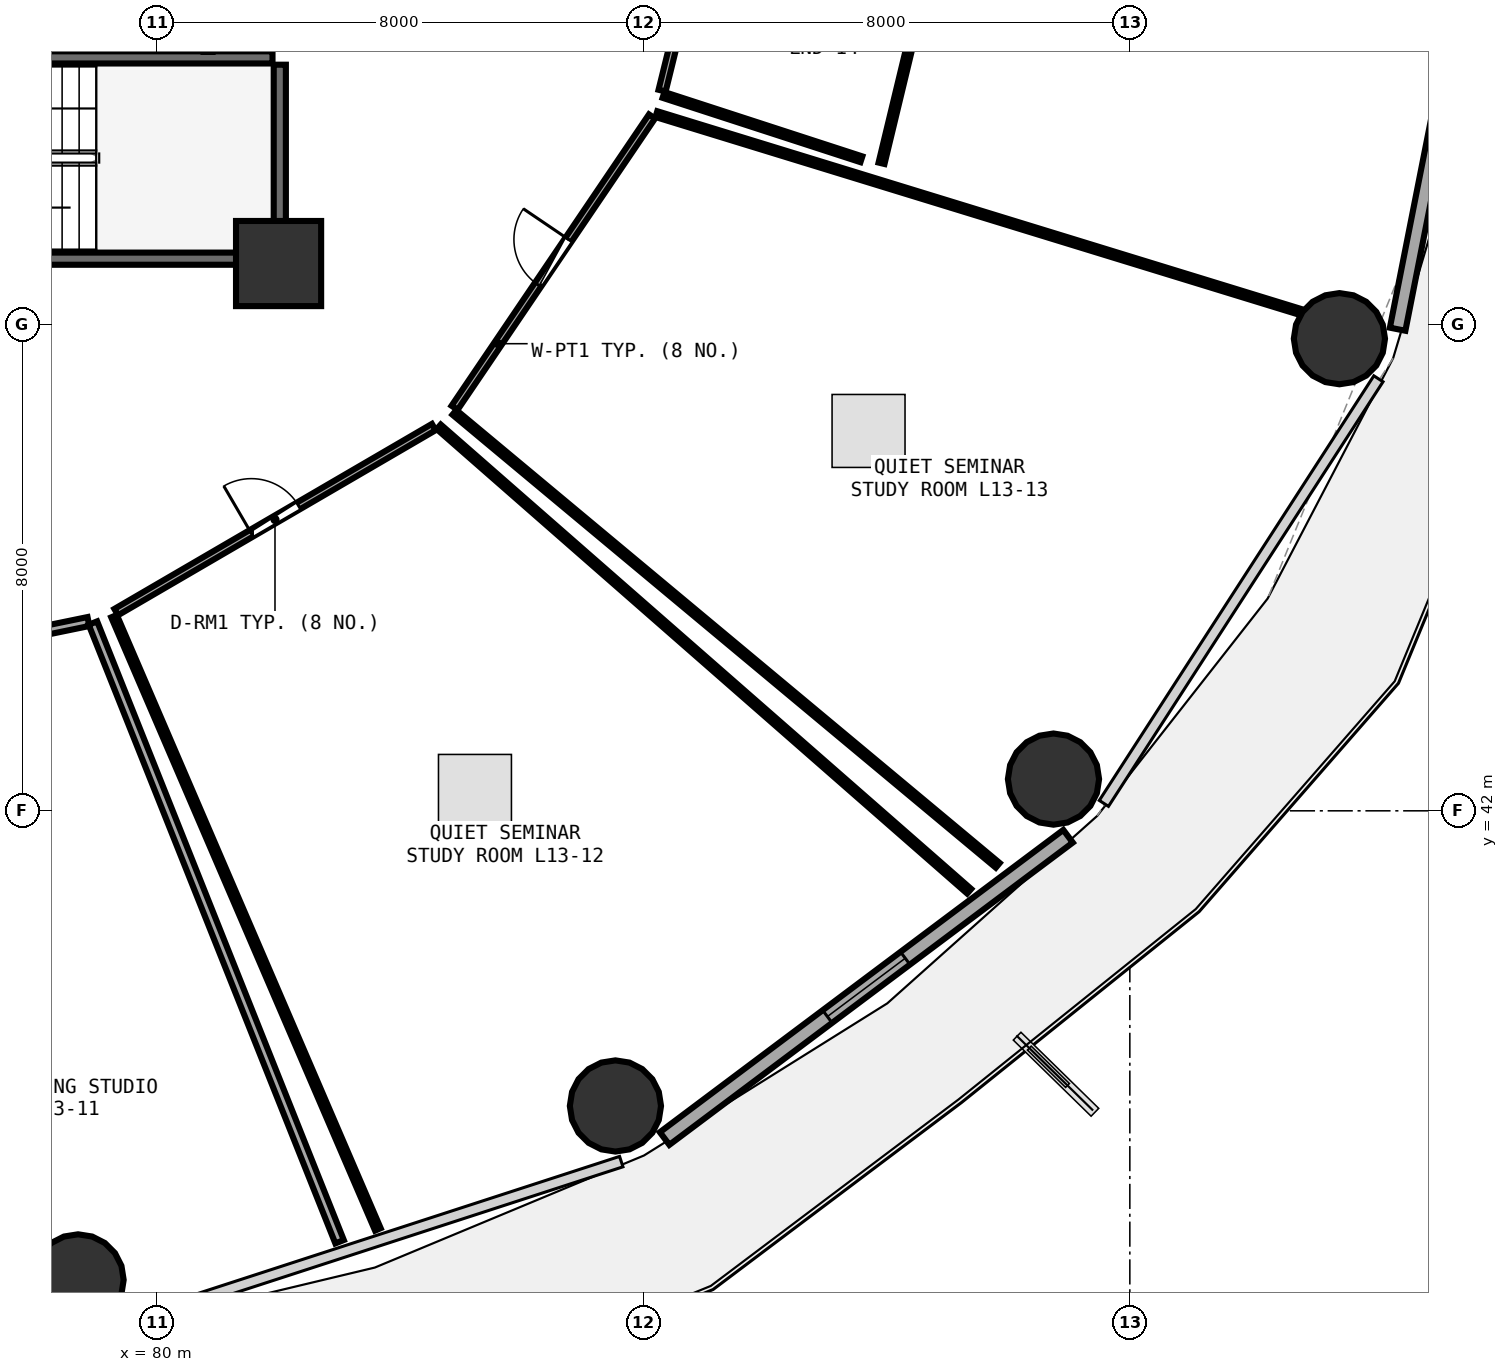
"""IFC4 building model, lengths in metres.
Left out: names, types, materials, properties, quantities, classifications, styles, units other than length and angle.
Written with IfcOpenShell. Run it as: python <this file> out.ifc"""

import sys

from ifc_helpers import new_model, si_unit, direction, frame, frame_2d, origin, origin_2d, place, context, subcontext, project, spatial, rectangle, circle, extrude, element, fill, save


model = new_model("IFC4")
c1 = context("Model", 3, precision=1e-05, world=origin(), true_north=direction((0.0, 1.0)))
c2 = subcontext(c1, "Body", "Model", "MODEL_VIEW")
j1 = project(units=[si_unit("LENGTHUNIT", "METRE"), si_unit("PLANEANGLEUNIT", "RADIAN")], contexts=[c1])
p1 = place(None, origin())
s1 = spatial("IfcSite", under=j1, at=p1, CompositionType="ELEMENT")
p2 = place(p1, origin())
s2 = spatial("IfcBuilding", under=s1, at=p2, CompositionType="ELEMENT")
p3 = place(p2, frame((0.0, 0.0, 52.5)))
s3 = spatial("IfcBuildingStorey", under=s2, at=p3, CompositionType="ELEMENT", Elevation=52.5)
p4 = place(p3, frame((82.0, 51.0, 0.0), z_axis=(0.0, 0.0, 1.0), x_axis=(1.0, 0.0, 0.0)))
e1 = element("IfcColumn", 1, at=p4, inside=s3, PredefinedType="PILASTER", context=c2, shape_type="SweptSolid", body=[
    extrude(rectangle(XDim=1.4, YDim=1.4, at=origin_2d()), origin(), (0.0, 0.0, 1.0), 3.75),
])
for number, where, z_axis, x_axis in (
    (2, (78.702, 34.286, 0.0), (0.0, 0.0, 1.0), (1.0, 0.0, 0.0)),
    (3, (87.54, 37.146, 0.0), (0.0, 0.0, 1.0), (1.0, 0.0, 0.0)),
    (4, (94.744, 42.522, 0.0), (0.0, 0.0, 1.0), (1.0, 0.0, 0.0)),
    (5, (99.447, 49.764, 0.0), (0.0, 0.0, 1.0), (1.0, 0.0, 0.0)),
):
    element("IfcColumn", number, at=place(p3, frame(where, z_axis=z_axis, x_axis=x_axis)), inside=s3, PredefinedType="COLUMN", context=c2, shape_type="SweptSolid", body=[
        extrude(circle(Radius=0.75, at=origin_2d()), origin(), (0.0, 0.0, 1.0), 3.75),
    ])
p5 = place(p3, frame((88.349, 36.611, 0.0), z_axis=(0.0, 0.0, 1.0), x_axis=(0.80030733173, 0.599590005569, 0.0)))
e6 = element("IfcWall", 6, at=p5, inside=s3, PredefinedType="SOLIDWALL", context=c2, shape_type="SweptSolid", body=[
    extrude(rectangle(XDim=8.291, YDim=0.26, at=frame_2d((4.145, 0.0))), origin(), (0.0, 0.0, 1.0), 3.475),
])
p6 = place(p5, frame((3.345, 0.0, 0.85)))
e7 = element("IfcOpeningElement", 7, at=p6, cuts=e6, PredefinedType="OPENING", context=c2, shape_type="SweptSolid", body=[
    extrude(rectangle(XDim=1.6, YDim=1.45, at=frame_2d((0.8, 0.725))), frame((0.0, 0.14, 0.0), z_axis=(0.0, -1.0, 0.0), x_axis=(1.0, 0.0, 0.0)), (0.0, 0.0, 1.0), 0.28),
])
p7 = place(p3, frame((100.404, 49.92, 0.0), z_axis=(0.0, 0.0, 1.0), x_axis=(0.193726159581, 0.98105564322, 0.0)))
e8 = element("IfcWall", 8, at=p7, inside=s3, PredefinedType="SOLIDWALL", context=c2, shape_type="SweptSolid", body=[
    extrude(rectangle(XDim=7.703, YDim=0.26, at=frame_2d((3.851, 0.0))), origin(), (0.0, 0.0, 1.0), 3.475),
])
p8 = place(p7, frame((3.051, 0.0, 0.85)))
e9 = element("IfcOpeningElement", 9, at=p8, cuts=e8, PredefinedType="OPENING", context=c2, shape_type="SweptSolid", body=[
    extrude(rectangle(XDim=1.6, YDim=1.45, at=frame_2d((0.8, 0.725))), frame((0.0, 0.14, 0.0), z_axis=(0.0, -1.0, 0.0), x_axis=(1.0, 0.0, 0.0)), (0.0, 0.0, 1.0), 0.28),
])
p9 = place(p3, frame((74.0, 51.08, 0.0), z_axis=(0.0, 0.0, 1.0), x_axis=(1.0, 0.0, 0.0)))
e10 = element("IfcWall", 10, at=p9, inside=s3, PredefinedType="SHEAR", context=c2, shape_type="SweptSolid", body=[
    extrude(rectangle(XDim=7.9, YDim=0.2, at=frame_2d((3.95, 0.0))), origin(), (0.0, 0.0, 1.0), 3.49),
])
p10 = place(p9, frame((1.12, 0.0, 0.0)))
e11 = element("IfcOpeningElement", 11, at=p10, cuts=e10, PredefinedType="OPENING", context=c2, shape_type="SweptSolid", body=[
    extrude(rectangle(XDim=1.05, YDim=2.1, at=frame_2d((0.525, 1.05))), frame((0.0, 0.11, 0.0), z_axis=(0.0, -1.0, 0.0), x_axis=(1.0, 0.0, 0.0)), (0.0, 0.0, 1.0), 0.22),
])
p11 = place(p3, frame((82.02, 51.2, 0.0), z_axis=(0.0, 0.0, 1.0), x_axis=(0.0, 1.0, 0.0)))
e12 = element("IfcWall", 12, at=p11, inside=s3, PredefinedType="SHEAR", context=c2, shape_type="SweptSolid", body=[
    extrude(rectangle(XDim=3.07, YDim=0.2, at=frame_2d((1.535, 0.0))), origin(), (0.0, 0.0, 1.0), 3.49),
])
p12 = place(p3, frame((81.9, 54.39, 0.0), z_axis=(0.0, 0.0, 1.0), x_axis=(-1.0, 0.0, 0.0)))
e13 = element("IfcWall", 13, at=p12, inside=s3, PredefinedType="SHEAR", context=c2, shape_type="SweptSolid", body=[
    extrude(rectangle(XDim=8.46, YDim=0.2, at=frame_2d((4.23, 0.0))), origin(), (0.0, 0.0, 1.0), 3.49),
])
p13 = place(p3, frame((75.732, 44.467, 0.0), z_axis=(0.0, 0.0, 1.0), x_axis=(0.979521553546, 0.201339330831, 0.0)))
e14 = element("IfcWall", 14, at=p13, inside=s3, PredefinedType="PARTITIONING", context=c2, shape_type="SweptSolid", body=[
    extrude(rectangle(XDim=3.207, YDim=0.15, at=frame_2d((1.604, 0.0))), origin(), (0.0, 0.0, 1.0), 3.235),
])
p14 = place(p13, frame((1.129, 0.0, 0.0)))
e15 = element("IfcOpeningElement", 15, at=p14, cuts=e14, PredefinedType="OPENING", context=c2, shape_type="SweptSolid", body=[
    extrude(rectangle(XDim=0.95, YDim=2.08, at=frame_2d((0.475, 1.04))), frame((0.0, 0.085, 0.0), z_axis=(0.0, -1.0, 0.0), x_axis=(1.0, 0.0, 0.0)), (0.0, 0.0, 1.0), 0.17),
])
p15 = place(p3, frame((79.33, 45.268, 0.0), z_axis=(0.0, 0.0, 1.0), x_axis=(0.864061520755, 0.503386221852, 0.0)))
e16 = element("IfcWall", 16, at=p15, inside=s3, PredefinedType="PARTITIONING", context=c2, shape_type="SweptSolid", body=[
    extrude(rectangle(XDim=6.044, YDim=0.12, at=frame_2d((3.022, 0.0))), origin(), (0.0, 0.0, 1.0), 2.875),
])
p16 = place(p15, frame((2.572, 0.0, 0.0)))
e17 = element("IfcOpeningElement", 17, at=p16, cuts=e16, PredefinedType="OPENING", context=c2, shape_type="SweptSolid", body=[
    extrude(rectangle(XDim=0.9, YDim=2.08, at=frame_2d((0.45, 1.04))), frame((0.0, 0.07, 0.0), z_axis=(0.0, -1.0, 0.0), x_axis=(1.0, 0.0, 0.0)), (0.0, 0.0, 1.0), 0.14),
])
p17 = place(p3, frame((84.895, 48.628, 0.0), z_axis=(0.0, 0.0, 1.0), x_axis=(0.560933949984, 0.827860558159, 0.0)))
e18 = element("IfcWall", 18, at=p17, inside=s3, PredefinedType="PARTITIONING", context=c2, shape_type="SweptSolid", body=[
    extrude(rectangle(XDim=5.788, YDim=0.12, at=frame_2d((2.894, 0.0))), origin(), (0.0, 0.0, 1.0), 2.875),
])
p18 = place(p17, frame((2.444, 0.0, 0.0)))
e19 = element("IfcOpeningElement", 19, at=p18, cuts=e18, PredefinedType="OPENING", context=c2, shape_type="SweptSolid", body=[
    extrude(rectangle(XDim=0.9, YDim=2.08, at=frame_2d((0.45, 1.04))), frame((0.0, 0.07, 0.0), z_axis=(0.0, -1.0, 0.0), x_axis=(1.0, 0.0, 0.0)), (0.0, 0.0, 1.0), 0.14),
])
p19 = place(p3, frame((88.307, 53.843, 0.0), z_axis=(0.0, 0.0, 1.0), x_axis=(0.239366536705, 0.970929277088, 0.0)))
e20 = element("IfcWall", 20, at=p19, inside=s3, PredefinedType="PARTITIONING", context=c2, shape_type="SweptSolid", body=[
    extrude(rectangle(XDim=2.466, YDim=0.12, at=frame_2d((1.233, 0.0))), origin(), (0.0, 0.0, 1.0), 3.48),
])
p20 = place(p19, frame((0.783, 0.0, 0.0)))
e21 = element("IfcOpeningElement", 21, at=p20, cuts=e20, PredefinedType="OPENING", context=c2, shape_type="SweptSolid", body=[
    extrude(rectangle(XDim=0.9, YDim=2.08, at=frame_2d((0.45, 1.04))), frame((0.0, 0.07, 0.0), z_axis=(0.0, -1.0, 0.0), x_axis=(1.0, 0.0, 0.0)), (0.0, 0.0, 1.0), 0.14),
])
p21 = place(p3, frame((78.947, 45.088, 0.0), z_axis=(0.0, 0.0, 1.0), x_axis=(0.370325956987, -0.928901870803, 0.0)))
e22 = element("IfcWall", 22, at=p21, inside=s3, PredefinedType="PARTITIONING", context=c2, shape_type="SweptSolid", body=[
    extrude(rectangle(XDim=10.954, YDim=0.15, at=frame_2d((5.477, 0.0))), origin(), (0.0, 0.0, 1.0), 2.875),
])
p22 = place(p3, frame((84.634, 48.315, 0.0), z_axis=(0.0, 0.0, 1.0), x_axis=(0.752403187404, -0.658702849231, 0.0)))
e23 = element("IfcWall", 23, at=p22, inside=s3, PredefinedType="PARTITIONING", context=c2, shape_type="SweptSolid", body=[
    extrude(rectangle(XDim=11.595, YDim=0.1, at=frame_2d((5.797, 0.0))), origin(), (0.0, 0.0, 1.0), 2.875),
])
p23 = place(p3, frame((83.633, 35.116, 0.0), z_axis=(0.0, 0.0, 1.0), x_axis=(-0.395239231563, 0.918578221946, 0.0)))
e24 = element("IfcWall", 24, at=p23, inside=s3, PredefinedType="PARTITIONING", context=c2, shape_type="SweptSolid", body=[
    extrude(rectangle(XDim=10.98, YDim=0.1, at=frame_2d((5.49, 0.0))), origin(), (0.0, 0.0, 1.0), 2.875),
])
p24 = place(p3, frame((88.213, 53.457, 0.0), z_axis=(0.0, 0.0, 1.0), x_axis=(0.955941269752, -0.29355798198, 0.0)))
e25 = element("IfcWall", 25, at=p24, inside=s3, PredefinedType="PARTITIONING", context=c2, shape_type="SweptSolid", body=[
    extrude(rectangle(XDim=11.083, YDim=0.1, at=frame_2d((5.542, 0.0))), origin(), (0.0, 0.0, 1.0), 3.175),
])
p25 = place(p3, frame((93.827, 41.104, 0.0), z_axis=(0.0, 0.0, 1.0), x_axis=(-0.768116338219, 0.640310308336, 0.0)))
e26 = element("IfcWall", 26, at=p25, inside=s3, PredefinedType="PARTITIONING", context=c2, shape_type="SweptSolid", body=[
    extrude(rectangle(XDim=11.633, YDim=0.1, at=frame_2d((5.817, 0.0))), origin(), (0.0, 0.0, 1.0), 2.875),
])
p26 = place(p3, frame((92.673, 55.783, 0.0), z_axis=(0.0, 0.0, 1.0), x_axis=(-0.234509762348, -0.97211376462, 0.0)))
e27 = element("IfcWall", 27, at=p26, inside=s3, PredefinedType="PARTITIONING", context=c2, shape_type="SweptSolid", body=[
    extrude(rectangle(XDim=3.224, YDim=0.1, at=frame_2d((1.612, 0.0))), origin(), (0.0, 0.0, 1.0), 3.48),
])
p27 = place(p3, frame((91.585, 52.715, 0.0), z_axis=(0.0, 0.0, 1.0), x_axis=(-0.950990540972, 0.309219971834, 0.0)))
e28 = element("IfcWall", 28, at=p27, inside=s3, PredefinedType="PARTITIONING", context=c2, shape_type="SweptSolid", body=[
    extrude(rectangle(XDim=3.422, YDim=0.1, at=frame_2d((1.711, 0.0))), origin(), (0.0, 0.0, 1.0), 3.235),
])
p28 = place(p6, origin())
e29 = element("IfcWindow", 29, at=p28, inside=s3, PartitioningType="SINGLE_PANEL", PredefinedType="WINDOW", context=c2, shape_type="SweptSolid", body=[
    extrude(rectangle(XDim=1.6, YDim=1.45, at=frame_2d((0.8, 0.725))), frame((0.0, 0.03, 0.0), z_axis=(0.0, -1.0, 0.0), x_axis=(1.0, 0.0, 0.0)), (0.0, 0.0, 1.0), 0.06),
])
fill(e7, e29)
p29 = place(p16, origin())
e30 = element("IfcDoor", 30, at=p29, inside=s3, OperationType="SINGLE_SWING_LEFT", PredefinedType="DOOR", context=c2, shape_type="SweptSolid", body=[
    extrude(rectangle(XDim=0.9, YDim=2.08, at=frame_2d((0.45, 1.04))), frame((0.0, 0.025, 0.0), z_axis=(0.0, -1.0, 0.0), x_axis=(1.0, 0.0, 0.0)), (0.0, 0.0, 1.0), 0.05),
])
fill(e17, e30)
p30 = place(p18, origin())
e31 = element("IfcDoor", 31, at=p30, inside=s3, OperationType="SINGLE_SWING_RIGHT", PredefinedType="DOOR", context=c2, shape_type="SweptSolid", body=[
    extrude(rectangle(XDim=0.9, YDim=2.08, at=frame_2d((0.45, 1.04))), frame((0.0, 0.025, 0.0), z_axis=(0.0, -1.0, 0.0), x_axis=(1.0, 0.0, 0.0)), (0.0, 0.0, 1.0), 0.05),
])
fill(e19, e31)
save(model, sys.argv[1])
